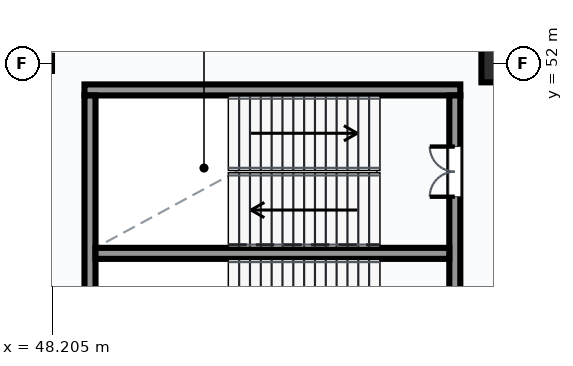
"""IFC4 building model, lengths in metres.
Left out: names, types, materials, properties, quantities, classifications, styles, units other than length and angle.
Written with IfcOpenShell. Run it as: python <this file> out.ifc"""

import sys

from ifc_helpers import new_model, si_unit, direction, frame, frame_2d, origin, origin_2d, place, context, subcontext, project, spatial, rectangle, extrude, element, fill, save


model = new_model("IFC4")
c1 = context("Model", 3, precision=1e-05, world=origin(), true_north=direction((0.0, 1.0)))
c2 = subcontext(c1, "Body", "Model", "MODEL_VIEW")
j1 = project(units=[si_unit("LENGTHUNIT", "METRE"), si_unit("PLANEANGLEUNIT", "RADIAN")], contexts=[c1])
p1 = place(None, origin())
s1 = spatial("IfcSite", under=j1, at=p1, CompositionType="ELEMENT")
p2 = place(p1, origin())
s2 = spatial("IfcBuilding", under=s1, at=p2, CompositionType="ELEMENT")
p3 = place(p2, frame((0.0, 0.0, 10.2)))
s3 = spatial("IfcBuildingStorey", under=s2, at=p3, CompositionType="ELEMENT", Elevation=10.2)
p4 = place(p3, frame((60.0, 52.0, 0.0), z_axis=(0.0, 0.0, 1.0), x_axis=(1.0, 0.0, 0.0)))
e1 = element("IfcColumn", 1, at=p4, inside=s3, PredefinedType="COLUMN", context=c2, shape_type="SweptSolid", body=[
    extrude(rectangle(XDim=1.0, YDim=1.0, at=origin_2d()), origin(), (0.0, 0.0, 1.0), 4.5),
])
p5 = place(p3, frame((49.055, 51.3, 0.0), z_axis=(0.0, 0.0, 1.0), x_axis=(1.0, 0.0, 0.0)))
e2 = element("IfcWall", 2, at=p5, inside=s3, PredefinedType="SHEAR", context=c2, shape_type="SweptSolid", body=[
    extrude(rectangle(XDim=9.89, YDim=0.29, at=frame_2d((4.945, 0.0))), origin(), (0.0, 0.0, 1.0), 4.5),
])
p6 = place(p3, frame((49.2, 42.845, 0.0), z_axis=(0.0, 0.0, 1.0), x_axis=(0.0, 1.0, 0.0)))
e3 = element("IfcWall", 3, at=p6, inside=s3, PredefinedType="SHEAR", context=c2, shape_type="SweptSolid", body=[
    extrude(rectangle(XDim=8.31, YDim=0.29, at=frame_2d((4.155, 0.0))), origin(), (0.0, 0.0, 1.0), 4.5),
])
p7 = place(p3, frame((58.8, 42.845, 0.0), z_axis=(0.0, 0.0, 1.0), x_axis=(0.0, 1.0, 0.0)))
e4 = element("IfcWall", 4, at=p7, inside=s3, PredefinedType="SHEAR", context=c2, shape_type="SweptSolid", body=[
    extrude(rectangle(XDim=8.31, YDim=0.29, at=frame_2d((4.155, 0.0))), origin(), (0.0, 0.0, 1.0), 4.5),
])
p8 = place(p7, frame((1.305, 0.0, 0.0)))
e5 = element("IfcOpeningElement", 5, at=p8, cuts=e4, PredefinedType="OPENING", context=c2, shape_type="SweptSolid", body=[
    extrude(rectangle(XDim=1.4, YDim=2.2, at=frame_2d((0.7, 1.1))), frame((0.0, 0.155, 0.0), z_axis=(0.0, -1.0, 0.0), x_axis=(1.0, 0.0, 0.0)), (0.0, 0.0, 1.0), 0.31),
])
p9 = place(p7, frame((5.645, 0.0, 0.0)))
e6 = element("IfcOpeningElement", 6, at=p9, cuts=e4, PredefinedType="OPENING", context=c2, shape_type="SweptSolid", body=[
    extrude(rectangle(XDim=1.32, YDim=2.2, at=frame_2d((0.66, 1.1))), frame((0.0, 0.155, 0.0), z_axis=(0.0, -1.0, 0.0), x_axis=(1.0, 0.0, 0.0)), (0.0, 0.0, 1.0), 0.31),
])
p10 = place(p3, frame((49.345, 47.0, 0.0), z_axis=(0.0, 0.0, 1.0), x_axis=(1.0, 0.0, 0.0)))
e7 = element("IfcWall", 7, at=p10, inside=s3, PredefinedType="SHEAR", context=c2, shape_type="SweptSolid", body=[
    extrude(rectangle(XDim=9.31, YDim=0.29, at=frame_2d((4.655, 0.0))), origin(), (0.0, 0.0, 1.0), 4.5),
])
p11 = place(p9, origin())
e8 = element("IfcDoor", 8, at=p11, inside=s3, OperationType="DOUBLE_DOOR_SINGLE_SWING", PredefinedType="DOOR", context=c2, shape_type="SweptSolid", body=[
    extrude(rectangle(XDim=1.32, YDim=2.2, at=frame_2d((0.66, 1.1))), frame((0.0, 0.025, 0.0), z_axis=(0.0, -1.0, 0.0), x_axis=(1.0, 0.0, 0.0)), (0.0, 0.0, 1.0), 0.05),
])
fill(e6, e8)
save(model, sys.argv[1])
